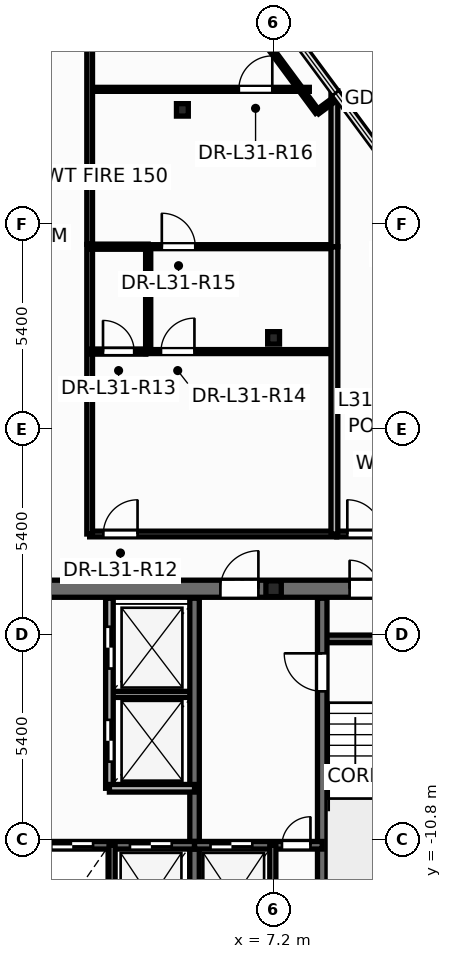
"""IFC4 building model, lengths in metres.
Left out: names, types, materials, properties, quantities, classifications, styles, units other than length and angle.
Written with IfcOpenShell. Run it as: python <this file> out.ifc"""

import sys

from ifc_helpers import new_model, si_unit, direction, frame, frame_2d, origin, origin_2d, place, context, subcontext, project, spatial, rectangle, i_section, extrude, element, fill, save


model = new_model("IFC4")
c1 = context("Model", 3, precision=1e-05, world=origin(), true_north=direction((0.0, 1.0)))
c2 = subcontext(c1, "Body", "Model", "MODEL_VIEW")
j1 = project(units=[si_unit("LENGTHUNIT", "METRE"), si_unit("PLANEANGLEUNIT", "RADIAN")], contexts=[c1])
p1 = place(None, origin())
s1 = spatial("IfcSite", under=j1, at=p1, CompositionType="ELEMENT")
p2 = place(p1, origin())
s2 = spatial("IfcBuilding", under=s1, at=p2, CompositionType="ELEMENT")
p3 = place(p2, frame((0.0, 0.0, 122.1)))
s3 = spatial("IfcBuildingStorey", under=s2, at=p3, CompositionType="ELEMENT", Elevation=122.1)
p4 = place(p3, frame((7.2, -4.2, 0.0), z_axis=(0.0, 0.0, 1.0), x_axis=(1.0, 0.0, 0.0)))
e1 = element("IfcColumn", 1, at=p4, inside=s3, PredefinedType="PILASTER", context=c2, shape_type="SweptSolid", body=[
    extrude(i_section(OverallWidth=0.405, OverallDepth=0.414, WebThickness=0.022, FlangeThickness=0.032, at=origin_2d()), origin(), (0.0, 0.0, 1.0), 3.6),
])
for number, where, z_axis, x_axis in (
    (2, (7.2, 2.4, 0.0), (0.0, 0.0, 1.0), (1.0, 0.0, 0.0)),
    (3, (4.8, 8.4, 0.0), (0.0, 0.0, 1.0), (1.0, 0.0, 0.0)),
):
    element("IfcColumn", number, at=place(p3, frame(where, z_axis=z_axis, x_axis=x_axis)), inside=s3, PredefinedType="COLUMN", context=c2, shape_type="SweptSolid", body=[
        extrude(i_section(OverallWidth=0.311, OverallDepth=0.327, WebThickness=0.016, FlangeThickness=0.025, at=origin_2d()), origin(), (0.0, 0.0, 1.0), 3.6),
    ])
p5 = place(p3, frame((2.88, -6.98, 0.0), z_axis=(0.0, 0.0, 1.0), x_axis=(1.0, 0.0, 0.0)))
e4 = element("IfcWall", 4, at=p5, inside=s3, PredefinedType="PARTITIONING", context=c2, shape_type="SweptSolid", body=[
    extrude(rectangle(XDim=2.24, YDim=0.16, at=frame_2d((1.12, 0.0))), origin(), (0.0, 0.0, 1.0), 3.35),
])
p6 = place(p3, frame((-12.65, -4.2, 0.0), z_axis=(0.0, 0.0, 1.0), x_axis=(1.0, 0.0, 0.0)))
e5 = element("IfcWall", 5, at=p6, inside=s3, PredefinedType="SHEAR", context=c2, shape_type="SweptSolid", body=[
    extrude(rectangle(XDim=25.3, YDim=0.45, at=frame_2d((12.65, 0.0))), origin(), (0.0, 0.0, 1.0), 3.6),
])
p7 = place(p6, frame((1.85, 0.0, 0.0)))
e6 = element("IfcOpeningElement", 6, at=p7, cuts=e5, PredefinedType="OPENING", context=c2, shape_type="SweptSolid", body=[
    extrude(rectangle(XDim=0.756, YDim=2.054, at=frame_2d((0.375, 1.027))), frame((0.0, 0.235, 0.0), z_axis=(0.0, -1.0, 0.0), x_axis=(1.0, 0.0, 0.0)), (0.0, 0.0, 1.0), 0.47),
])
p8 = place(p6, frame((21.85, 0.0, 0.0)))
e7 = element("IfcOpeningElement", 7, at=p8, cuts=e5, PredefinedType="OPENING", context=c2, shape_type="SweptSolid", body=[
    extrude(rectangle(XDim=0.756, YDim=2.054, at=frame_2d((0.375, 1.027))), frame((0.0, 0.235, 0.0), z_axis=(0.0, -1.0, 0.0), x_axis=(1.0, 0.0, 0.0)), (0.0, 0.0, 1.0), 0.47),
])
p9 = place(p6, frame((23.5, 0.0, 0.0)))
e8 = element("IfcOpeningElement", 8, at=p9, cuts=e5, PredefinedType="OPENING", context=c2, shape_type="SweptSolid", body=[
    extrude(rectangle(XDim=0.756, YDim=2.054, at=frame_2d((0.375, 1.027))), frame((0.0, 0.235, 0.0), z_axis=(0.0, -1.0, 0.0), x_axis=(1.0, 0.0, 0.0)), (0.0, 0.0, 1.0), 0.47),
])
p10 = place(p6, frame((5.85, 0.0, 0.0)))
e9 = element("IfcOpeningElement", 9, at=p10, cuts=e5, PredefinedType="OPENING", context=c2, shape_type="SweptSolid", body=[
    extrude(rectangle(XDim=1.006, YDim=2.104, at=frame_2d((0.5, 1.052))), frame((0.0, 0.235, 0.0), z_axis=(0.0, -1.0, 0.0), x_axis=(1.0, 0.0, 0.0)), (0.0, 0.0, 1.0), 0.47),
])
p11 = place(p6, frame((10.35, 0.0, 0.0)))
e10 = element("IfcOpeningElement", 10, at=p11, cuts=e5, PredefinedType="OPENING", context=c2, shape_type="SweptSolid", body=[
    extrude(rectangle(XDim=1.406, YDim=2.154, at=frame_2d((0.7, 1.077))), frame((0.0, 0.235, 0.0), z_axis=(0.0, -1.0, 0.0), x_axis=(1.0, 0.0, 0.0)), (0.0, 0.0, 1.0), 0.47),
])
p12 = place(p6, frame((18.45, 0.0, 0.0)))
e11 = element("IfcOpeningElement", 11, at=p12, cuts=e5, PredefinedType="OPENING", context=c2, shape_type="SweptSolid", body=[
    extrude(rectangle(XDim=1.006, YDim=2.104, at=frame_2d((0.5, 1.052))), frame((0.0, 0.235, 0.0), z_axis=(0.0, -1.0, 0.0), x_axis=(1.0, 0.0, 0.0)), (0.0, 0.0, 1.0), 0.47),
])
p13 = place(p3, frame((8.48, -5.52, 0.0), z_axis=(0.0, 0.0, 1.0), x_axis=(1.0, 0.0, 0.0)))
e12 = element("IfcWall", 12, at=p13, inside=s3, PredefinedType="SOLIDWALL", context=c2, shape_type="SweptSolid", body=[
    extrude(rectangle(XDim=3.87, YDim=0.2, at=frame_2d((1.935, 0.0))), origin(), (0.0, 0.0, 1.0), 3.6),
])
p14 = place(p3, frame((8.48, -13.85, 0.0), z_axis=(0.0, 0.0, 1.0), x_axis=(0.0, 1.0, 0.0)))
e13 = element("IfcWall", 13, at=p14, inside=s3, PredefinedType="SHEAR", context=c2, shape_type="SweptSolid", body=[
    extrude(rectangle(XDim=9.4, YDim=0.25, at=frame_2d((4.7, 0.0))), origin(), (0.0, 0.0, 1.0), 3.6),
])
p15 = place(p14, frame((6.95, 0.0, 0.0)))
e14 = element("IfcOpeningElement", 14, at=p15, cuts=e13, PredefinedType="OPENING", context=c2, shape_type="SweptSolid", body=[
    extrude(rectangle(XDim=1.006, YDim=2.104, at=frame_2d((0.5, 1.052))), frame((0.0, 0.135, 0.0), z_axis=(0.0, -1.0, 0.0), x_axis=(1.0, 0.0, 0.0)), (0.0, 0.0, 1.0), 0.27),
])
p16 = place(p3, frame((5.12, -13.85, 0.0), z_axis=(0.0, 0.0, 1.0), x_axis=(0.0, 1.0, 0.0)))
e15 = element("IfcWall", 15, at=p16, inside=s3, PredefinedType="SHEAR", context=c2, shape_type="SweptSolid", body=[
    extrude(rectangle(XDim=9.4, YDim=0.25, at=frame_2d((4.7, 0.0))), origin(), (0.0, 0.0, 1.0), 3.6),
])
p17 = place(p3, frame((-5.12, -10.95, 0.0), z_axis=(0.0, 0.0, 1.0), x_axis=(1.0, 0.0, 0.0)))
e16 = element("IfcWall", 16, at=p17, inside=s3, PredefinedType="SOLIDWALL", context=c2, shape_type="SweptSolid", body=[
    extrude(rectangle(XDim=10.24, YDim=0.2, at=frame_2d((5.12, 0.0))), origin(), (0.0, 0.0, 1.0), 3.6),
])
p18 = place(p17, frame((0.6, 0.0, 0.0)))
e17 = element("IfcOpeningElement", 17, at=p18, cuts=e16, PredefinedType="OPENING", context=c2, shape_type="SweptSolid", body=[
    extrude(rectangle(XDim=1.106, YDim=2.104, at=frame_2d((0.55, 1.052))), frame((0.0, 0.11, 0.0), z_axis=(0.0, -1.0, 0.0), x_axis=(1.0, 0.0, 0.0)), (0.0, 0.0, 1.0), 0.22),
])
p19 = place(p17, frame((2.67, 0.0, 0.0)))
e18 = element("IfcOpeningElement", 18, at=p19, cuts=e16, PredefinedType="OPENING", context=c2, shape_type="SweptSolid", body=[
    extrude(rectangle(XDim=1.106, YDim=2.104, at=frame_2d((0.55, 1.052))), frame((0.0, 0.11, 0.0), z_axis=(0.0, -1.0, 0.0), x_axis=(1.0, 0.0, 0.0)), (0.0, 0.0, 1.0), 0.22),
])
p20 = place(p17, frame((4.57, 0.0, 0.0)))
e19 = element("IfcOpeningElement", 19, at=p20, cuts=e16, PredefinedType="OPENING", context=c2, shape_type="SweptSolid", body=[
    extrude(rectangle(XDim=1.106, YDim=2.104, at=frame_2d((0.55, 1.052))), frame((0.0, 0.11, 0.0), z_axis=(0.0, -1.0, 0.0), x_axis=(1.0, 0.0, 0.0)), (0.0, 0.0, 1.0), 0.22),
])
p21 = place(p17, frame((6.47, 0.0, 0.0)))
e20 = element("IfcOpeningElement", 20, at=p21, cuts=e16, PredefinedType="OPENING", context=c2, shape_type="SweptSolid", body=[
    extrude(rectangle(XDim=1.106, YDim=2.104, at=frame_2d((0.55, 1.052))), frame((0.0, 0.11, 0.0), z_axis=(0.0, -1.0, 0.0), x_axis=(1.0, 0.0, 0.0)), (0.0, 0.0, 1.0), 0.22),
])
p22 = place(p17, frame((8.54, 0.0, 0.0)))
e21 = element("IfcOpeningElement", 21, at=p22, cuts=e16, PredefinedType="OPENING", context=c2, shape_type="SweptSolid", body=[
    extrude(rectangle(XDim=1.106, YDim=2.104, at=frame_2d((0.55, 1.052))), frame((0.0, 0.11, 0.0), z_axis=(0.0, -1.0, 0.0), x_axis=(1.0, 0.0, 0.0)), (0.0, 0.0, 1.0), 0.22),
])
p23 = place(p3, frame((5.12, -10.95, 0.0), z_axis=(0.0, 0.0, 1.0), x_axis=(1.0, 0.0, 0.0)))
e22 = element("IfcWall", 22, at=p23, inside=s3, PredefinedType="SOLIDWALL", context=c2, shape_type="SweptSolid", body=[
    extrude(rectangle(XDim=3.36, YDim=0.2, at=frame_2d((1.68, 0.0))), origin(), (0.0, 0.0, 1.0), 3.6),
])
p24 = place(p23, frame((0.42, 0.0, 0.0)))
e23 = element("IfcOpeningElement", 23, at=p24, cuts=e22, PredefinedType="OPENING", context=c2, shape_type="SweptSolid", body=[
    extrude(rectangle(XDim=1.106, YDim=2.104, at=frame_2d((0.55, 1.052))), frame((0.0, 0.11, 0.0), z_axis=(0.0, -1.0, 0.0), x_axis=(1.0, 0.0, 0.0)), (0.0, 0.0, 1.0), 0.22),
])
p25 = place(p23, frame((2.3, 0.0, 0.0)))
e24 = element("IfcOpeningElement", 24, at=p25, cuts=e22, PredefinedType="OPENING", context=c2, shape_type="SweptSolid", body=[
    extrude(rectangle(XDim=0.756, YDim=2.054, at=frame_2d((0.375, 1.027))), frame((0.0, 0.11, 0.0), z_axis=(0.0, -1.0, 0.0), x_axis=(1.0, 0.0, 0.0)), (0.0, 0.0, 1.0), 0.22),
])
for number, where, z_axis, x_axis in (
    (25, (7.18, -13.85, 0.0), (0.0, 0.0, 1.0), (0.0, 1.0, 0.0)),
    (26, (2.95, -13.85, 0.0), (0.0, 0.0, 1.0), (0.0, 1.0, 0.0)),
):
    element("IfcWall", number, at=place(p3, frame(where, z_axis=z_axis, x_axis=x_axis)), inside=s3, PredefinedType="PARTITIONING", context=c2, shape_type="SweptSolid", body=[
        extrude(rectangle(XDim=2.9, YDim=0.16, at=frame_2d((1.45, 0.0))), origin(), (0.0, 0.0, 1.0), 2.475),
    ])
p26 = place(p3, frame((2.88, -9.45, 0.0), z_axis=(0.0, 0.0, 1.0), x_axis=(0.0, 1.0, 0.0)))
e27 = element("IfcWall", 27, at=p26, inside=s3, PredefinedType="SOLIDWALL", context=c2, shape_type="SweptSolid", body=[
    extrude(rectangle(XDim=5.0, YDim=0.2, at=frame_2d((2.5, 0.0))), origin(), (0.0, 0.0, 1.0), 3.35),
])
p27 = place(p26, frame((0.7, 0.0, 0.0)))
e28 = element("IfcOpeningElement", 28, at=p27, cuts=e27, PredefinedType="OPENING", context=c2, shape_type="SweptSolid", body=[
    extrude(rectangle(XDim=1.106, YDim=2.104, at=frame_2d((0.55, 1.052))), frame((0.0, 0.11, 0.0), z_axis=(0.0, -1.0, 0.0), x_axis=(1.0, 0.0, 0.0)), (0.0, 0.0, 1.0), 0.22),
])
p28 = place(p26, frame((3.15, 0.0, 0.0)))
e29 = element("IfcOpeningElement", 29, at=p28, cuts=e27, PredefinedType="OPENING", context=c2, shape_type="SweptSolid", body=[
    extrude(rectangle(XDim=1.106, YDim=2.104, at=frame_2d((0.55, 1.052))), frame((0.0, 0.11, 0.0), z_axis=(0.0, -1.0, 0.0), x_axis=(1.0, 0.0, 0.0)), (0.0, 0.0, 1.0), 0.22),
])
p29 = place(p3, frame((2.88, -9.45, 0.0), z_axis=(0.0, 0.0, 1.0), x_axis=(1.0, 0.0, 0.0)))
e30 = element("IfcWall", 30, at=p29, inside=s3, PredefinedType="SOLIDWALL", context=c2, shape_type="SweptSolid", body=[
    extrude(rectangle(XDim=2.24, YDim=0.2, at=frame_2d((1.12, 0.0))), origin(), (0.0, 0.0, 1.0), 3.35),
])
p30 = place(p3, frame((2.36, -2.76, 0.0), z_axis=(0.0, 0.0, 1.0), x_axis=(1.0, 0.0, 0.0)))
e31 = element("IfcWall", 31, at=p30, inside=s3, PredefinedType="PARTITIONING", context=c2, shape_type="SweptSolid", body=[
    extrude(rectangle(XDim=6.5, YDim=0.15, at=frame_2d((3.25, 0.0))), origin(), (0.0, 0.0, 1.0), 2.325),
])
p31 = place(p30, frame((0.36, 0.0, 0.0)))
e32 = element("IfcOpeningElement", 32, at=p31, cuts=e31, PredefinedType="OPENING", context=c2, shape_type="SweptSolid", body=[
    extrude(rectangle(XDim=0.906, YDim=2.104, at=frame_2d((0.45, 1.052))), frame((0.0, 0.085, 0.0), z_axis=(0.0, -1.0, 0.0), x_axis=(1.0, 0.0, 0.0)), (0.0, 0.0, 1.0), 0.17),
])
p32 = place(p3, frame((8.862, -2.76, 0.0), z_axis=(0.0, 0.0, 1.0), x_axis=(1.0, 0.0, 0.0)))
e33 = element("IfcWall", 33, at=p32, inside=s3, PredefinedType="PARTITIONING", context=c2, shape_type="SweptSolid", body=[
    extrude(rectangle(XDim=5.778, YDim=0.15, at=frame_2d((2.889, 0.0))), origin(), (0.0, 0.0, 1.0), 3.35),
])
p33 = place(p32, frame((0.278, 0.0, 0.0)))
e34 = element("IfcOpeningElement", 34, at=p33, cuts=e33, PredefinedType="OPENING", context=c2, shape_type="SweptSolid", body=[
    extrude(rectangle(XDim=0.906, YDim=2.104, at=frame_2d((0.45, 1.052))), frame((0.0, 0.085, 0.0), z_axis=(0.0, -1.0, 0.0), x_axis=(1.0, 0.0, 0.0)), (0.0, 0.0, 1.0), 0.17),
])
p34 = place(p3, frame((2.36, 8.94, 0.0), z_axis=(0.0, 0.0, 1.0), x_axis=(1.0, 0.0, 0.0)))
e35 = element("IfcWall", 35, at=p34, inside=s3, PredefinedType="PARTITIONING", context=c2, shape_type="SweptSolid", body=[
    extrude(rectangle(XDim=5.78, YDim=0.105, at=frame_2d((2.89, 0.0))), origin(), (0.0, 0.0, 1.0), 2.617),
])
p35 = place(p34, frame((3.926, 0.0, 0.0)))
e36 = element("IfcOpeningElement", 36, at=p35, cuts=e35, PredefinedType="OPENING", context=c2, shape_type="SweptSolid", body=[
    extrude(rectangle(XDim=0.886, YDim=2.104, at=frame_2d((0.44, 1.052))), frame((0.0, 0.062, 0.0), z_axis=(0.0, -1.0, 0.0), x_axis=(1.0, 0.0, 0.0)), (0.0, 0.0, 1.0), 0.125),
])
p36 = place(p3, frame((3.84, 2.04, 0.0), z_axis=(0.0, 0.0, 1.0), x_axis=(1.0, 0.0, 0.0)))
e37 = element("IfcWall", 37, at=p36, inside=s3, PredefinedType="PARTITIONING", context=c2, shape_type="SweptSolid", body=[
    extrude(rectangle(XDim=4.96, YDim=0.105, at=frame_2d((2.48, 0.0))), origin(), (0.0, 0.0, 1.0), 2.325),
])
p37 = place(p36, frame((0.397, 0.0, 0.0)))
e38 = element("IfcOpeningElement", 38, at=p37, cuts=e37, PredefinedType="OPENING", context=c2, shape_type="SweptSolid", body=[
    extrude(rectangle(XDim=0.886, YDim=2.104, at=frame_2d((0.44, 1.052))), frame((0.0, 0.062, 0.0), z_axis=(0.0, -1.0, 0.0), x_axis=(1.0, 0.0, 0.0)), (0.0, 0.0, 1.0), 0.125),
])
p38 = place(p3, frame((3.9, 4.8, 0.0), z_axis=(0.0, 0.0, 1.0), x_axis=(1.0, 0.0, 0.0)))
e39 = element("IfcWall", 39, at=p38, inside=s3, PredefinedType="PARTITIONING", context=c2, shape_type="SweptSolid", body=[
    extrude(rectangle(XDim=4.9, YDim=0.105, at=frame_2d((2.45, 0.0))), origin(), (0.0, 0.0, 1.0), 2.617),
])
p39 = place(p38, frame((0.359, 0.0, 0.0)))
e40 = element("IfcOpeningElement", 40, at=p39, cuts=e39, PredefinedType="OPENING", context=c2, shape_type="SweptSolid", body=[
    extrude(rectangle(XDim=0.886, YDim=2.104, at=frame_2d((0.44, 1.052))), frame((0.0, 0.062, 0.0), z_axis=(0.0, -1.0, 0.0), x_axis=(1.0, 0.0, 0.0)), (0.0, 0.0, 1.0), 0.125),
])
p40 = place(p3, frame((2.36, -2.76, 0.0), z_axis=(0.0, 0.0, 1.0), x_axis=(0.0, 1.0, 0.0)))
e41 = element("IfcWall", 41, at=p40, inside=s3, PredefinedType="PARTITIONING", context=c2, shape_type="SweptSolid", body=[
    extrude(rectangle(XDim=7.62, YDim=0.15, at=frame_2d((3.81, 0.0))), origin(), (0.0, 0.0, 1.0), 2.325),
])
p41 = place(p3, frame((8.8, -2.76, 0.0), z_axis=(0.0, 0.0, 1.0), x_axis=(0.0, 1.0, 0.0)))
e42 = element("IfcWall", 42, at=p41, inside=s3, PredefinedType="PARTITIONING", context=c2, shape_type="SweptSolid", body=[
    extrude(rectangle(XDim=7.56, YDim=0.18, at=frame_2d((3.78, 0.0))), origin(), (0.0, 0.0, 1.0), 2.617),
])
p42 = place(p3, frame((2.36, 4.862, 0.0), z_axis=(0.0, 0.0, 1.0), x_axis=(0.0, 1.0, 0.0)))
e43 = element("IfcWall", 43, at=p42, inside=s3, PredefinedType="PARTITIONING", context=c2, shape_type="SweptSolid", body=[
    extrude(rectangle(XDim=8.18, YDim=0.15, at=frame_2d((4.09, 0.0))), origin(), (0.0, 0.0, 1.0), 2.617),
])
p43 = place(p3, frame((8.8, 4.8, 0.0), z_axis=(0.0, 0.0, 1.0), x_axis=(0.0, 1.0, 0.0)))
e44 = element("IfcWall", 44, at=p43, inside=s3, PredefinedType="PARTITIONING", context=c2, shape_type="SweptSolid", body=[
    extrude(rectangle(XDim=4.1, YDim=0.18, at=frame_2d((2.05, 0.0))), origin(), (0.0, 0.0, 1.0), 2.617),
])
p44 = place(p3, frame((3.9, 2.04, 0.0), z_axis=(0.0, 0.0, 1.0), x_axis=(0.0, 1.0, 0.0)))
e45 = element("IfcWall", 45, at=p44, inside=s3, PredefinedType="PARTITIONING", context=c2, shape_type="SweptSolid", body=[
    extrude(rectangle(XDim=2.76, YDim=0.135, at=frame_2d((1.38, 0.0))), origin(), (0.0, 0.0, 1.0), 2.325),
])
p45 = place(p3, frame((8.353, 8.344, 0.0), z_axis=(0.0, 0.0, 1.0), x_axis=(-0.594589014846, 0.804029790135, 0.0)))
e46 = element("IfcWall", 46, at=p45, inside=s3, PredefinedType="PARTITIONING", context=c2, shape_type="SweptSolid", body=[
    extrude(rectangle(XDim=2.323, YDim=0.12, at=frame_2d((1.162, 0.0))), origin(), (0.0, 0.0, 1.0), 3.35),
])
p46 = place(p3, frame((2.36, 2.04, 0.0), z_axis=(0.0, 0.0, 1.0), x_axis=(1.0, 0.0, 0.0)))
e47 = element("IfcWall", 47, at=p46, inside=s3, PredefinedType="PARTITIONING", context=c2, shape_type="SweptSolid", body=[
    extrude(rectangle(XDim=1.478, YDim=0.135, at=frame_2d((0.739, 0.0))), origin(), (0.0, 0.0, 1.0), 2.918),
])
p47 = place(p46, frame((0.351, 0.0, 0.0)))
e48 = element("IfcOpeningElement", 48, at=p47, cuts=e47, PredefinedType="OPENING", context=c2, shape_type="SweptSolid", body=[
    extrude(rectangle(XDim=0.826, YDim=2.104, at=frame_2d((0.41, 1.052))), frame((0.0, 0.078, 0.0), z_axis=(0.0, -1.0, 0.0), x_axis=(1.0, 0.0, 0.0)), (0.0, 0.0, 1.0), 0.155),
])
p48 = place(p3, frame((2.36, 4.8, 0.0), z_axis=(0.0, 0.0, 1.0), x_axis=(1.0, 0.0, 0.0)))
e49 = element("IfcWall", 49, at=p48, inside=s3, PredefinedType="PARTITIONING", context=c2, shape_type="SweptSolid", body=[
    extrude(rectangle(XDim=1.54, YDim=0.135, at=frame_2d((0.77, 0.0))), origin(), (0.0, 0.0, 1.0), 2.918),
])
p49 = place(p3, frame((8.891, 8.743, 0.0), z_axis=(0.0, 0.0, 1.0), x_axis=(-0.803918563719, -0.594739390748, 0.0)))
e50 = element("IfcWall", 50, at=p49, inside=s3, PredefinedType="PARTITIONING", context=c2, shape_type="SweptSolid", body=[
    extrude(rectangle(XDim=0.67, YDim=0.12, at=frame_2d((0.335, 0.0))), origin(), (0.0, 0.0, 1.0), 2.792),
])
p50 = place(p27, origin())
e51 = element("IfcDoor", 51, at=p50, inside=s3, OperationType="DOUBLE_DOOR_SLIDING", PredefinedType="DOOR", context=c2, shape_type="SweptSolid", body=[
    extrude(rectangle(XDim=1.1, YDim=2.1, at=frame_2d((0.55, 1.05))), frame((0.0, 0.025, 0.0), z_axis=(0.0, -1.0, 0.0), x_axis=(1.0, 0.0, 0.0)), (0.0, 0.0, 1.0), 0.05),
])
fill(e28, e51)
p51 = place(p28, origin())
e52 = element("IfcDoor", 52, at=p51, inside=s3, OperationType="DOUBLE_DOOR_SLIDING", PredefinedType="DOOR", context=c2, shape_type="SweptSolid", body=[
    extrude(rectangle(XDim=1.1, YDim=2.1, at=frame_2d((0.55, 1.05))), frame((0.0, 0.025, 0.0), z_axis=(0.0, -1.0, 0.0), x_axis=(1.0, 0.0, 0.0)), (0.0, 0.0, 1.0), 0.05),
])
fill(e29, e52)
p52 = place(p15, origin())
e53 = element("IfcDoor", 53, at=p52, inside=s3, OperationType="SINGLE_SWING_RIGHT", PredefinedType="DOOR", context=c2, shape_type="SweptSolid", body=[
    extrude(rectangle(XDim=1.0, YDim=2.1, at=frame_2d((0.5, 1.05))), frame((0.0, 0.025, 0.0), z_axis=(0.0, -1.0, 0.0), x_axis=(1.0, 0.0, 0.0)), (0.0, 0.0, 1.0), 0.05),
])
fill(e14, e53)
p53 = place(p24, origin())
e54 = element("IfcDoor", 54, at=p53, inside=s3, OperationType="DOUBLE_DOOR_SLIDING", PredefinedType="DOOR", context=c2, shape_type="SweptSolid", body=[
    extrude(rectangle(XDim=1.1, YDim=2.1, at=frame_2d((0.55, 1.05))), frame((0.0, 0.025, 0.0), z_axis=(0.0, -1.0, 0.0), x_axis=(1.0, 0.0, 0.0)), (0.0, 0.0, 1.0), 0.05),
])
fill(e23, e54)
p54 = place(p25, origin())
e55 = element("IfcDoor", 55, at=p54, inside=s3, OperationType="SINGLE_SWING_RIGHT", PredefinedType="DOOR", context=c2, shape_type="SweptSolid", body=[
    extrude(rectangle(XDim=0.75, YDim=2.05, at=frame_2d((0.375, 1.025))), frame((0.0, 0.025, 0.0), z_axis=(0.0, -1.0, 0.0), x_axis=(1.0, 0.0, 0.0)), (0.0, 0.0, 1.0), 0.05),
])
fill(e24, e55)
p55 = place(p21, origin())
e56 = element("IfcDoor", 56, at=p55, inside=s3, OperationType="DOUBLE_DOOR_SLIDING", PredefinedType="DOOR", context=c2, shape_type="SweptSolid", body=[
    extrude(rectangle(XDim=1.1, YDim=2.1, at=frame_2d((0.55, 1.05))), frame((0.0, 0.025, 0.0), z_axis=(0.0, -1.0, 0.0), x_axis=(1.0, 0.0, 0.0)), (0.0, 0.0, 1.0), 0.05),
])
fill(e20, e56)
p56 = place(p22, origin())
e57 = element("IfcDoor", 57, at=p56, inside=s3, OperationType="DOUBLE_DOOR_SLIDING", PredefinedType="DOOR", context=c2, shape_type="SweptSolid", body=[
    extrude(rectangle(XDim=1.1, YDim=2.1, at=frame_2d((0.55, 1.05))), frame((0.0, 0.025, 0.0), z_axis=(0.0, -1.0, 0.0), x_axis=(1.0, 0.0, 0.0)), (0.0, 0.0, 1.0), 0.05),
])
fill(e21, e57)
p57 = place(p8, origin())
e58 = element("IfcDoor", 58, at=p57, inside=s3, OperationType="SINGLE_SWING_LEFT", PredefinedType="DOOR", context=c2, shape_type="SweptSolid", body=[
    extrude(rectangle(XDim=0.75, YDim=2.05, at=frame_2d((0.375, 1.025))), frame((0.0, 0.025, 0.0), z_axis=(0.0, -1.0, 0.0), x_axis=(1.0, 0.0, 0.0)), (0.0, 0.0, 1.0), 0.05),
])
fill(e7, e58)
p58 = place(p12, origin())
e59 = element("IfcDoor", 59, at=p58, inside=s3, OperationType="SINGLE_SWING_RIGHT", PredefinedType="DOOR", context=c2, shape_type="SweptSolid", body=[
    extrude(rectangle(XDim=1.0, YDim=2.1, at=frame_2d((0.5, 1.05))), frame((0.0, 0.025, 0.0), z_axis=(0.0, -1.0, 0.0), x_axis=(1.0, 0.0, 0.0)), (0.0, 0.0, 1.0), 0.05),
])
fill(e11, e59)
p59 = place(p31, origin())
e60 = element("IfcDoor", 60, at=p59, inside=s3, OperationType="SINGLE_SWING_RIGHT", PredefinedType="DOOR", context=c2, shape_type="SweptSolid", body=[
    extrude(rectangle(XDim=0.9, YDim=2.1, at=frame_2d((0.45, 1.05))), frame((0.0, 0.025, 0.0), z_axis=(0.0, -1.0, 0.0), x_axis=(1.0, 0.0, 0.0)), (0.0, 0.0, 1.0), 0.05),
])
fill(e32, e60)
p60 = place(p47, origin())
e61 = element("IfcDoor", 61, at=p60, inside=s3, OperationType="SINGLE_SWING_LEFT", PredefinedType="DOOR", context=c2, shape_type="SweptSolid", body=[
    extrude(rectangle(XDim=0.82, YDim=2.1, at=frame_2d((0.41, 1.05))), frame((0.0, 0.025, 0.0), z_axis=(0.0, -1.0, 0.0), x_axis=(1.0, 0.0, 0.0)), (0.0, 0.0, 1.0), 0.05),
])
fill(e48, e61)
p61 = place(p37, origin())
e62 = element("IfcDoor", 62, at=p61, inside=s3, OperationType="SINGLE_SWING_RIGHT", PredefinedType="DOOR", context=c2, shape_type="SweptSolid", body=[
    extrude(rectangle(XDim=0.88, YDim=2.1, at=frame_2d((0.44, 1.05))), frame((0.0, 0.025, 0.0), z_axis=(0.0, -1.0, 0.0), x_axis=(1.0, 0.0, 0.0)), (0.0, 0.0, 1.0), 0.05),
])
fill(e38, e62)
p62 = place(p39, origin())
e63 = element("IfcDoor", 63, at=p62, inside=s3, OperationType="SINGLE_SWING_LEFT", PredefinedType="DOOR", context=c2, shape_type="SweptSolid", body=[
    extrude(rectangle(XDim=0.88, YDim=2.1, at=frame_2d((0.44, 1.05))), frame((0.0, 0.025, 0.0), z_axis=(0.0, -1.0, 0.0), x_axis=(1.0, 0.0, 0.0)), (0.0, 0.0, 1.0), 0.05),
])
fill(e40, e63)
p63 = place(p35, origin())
e64 = element("IfcDoor", 64, at=p63, inside=s3, OperationType="SINGLE_SWING_RIGHT", PredefinedType="DOOR", context=c2, shape_type="SweptSolid", body=[
    extrude(rectangle(XDim=0.88, YDim=2.1, at=frame_2d((0.44, 1.05))), frame((0.0, 0.025, 0.0), z_axis=(0.0, -1.0, 0.0), x_axis=(1.0, 0.0, 0.0)), (0.0, 0.0, 1.0), 0.05),
])
fill(e36, e64)
p64 = place(p33, origin())
e65 = element("IfcDoor", 65, at=p64, inside=s3, OperationType="SINGLE_SWING_LEFT", PredefinedType="DOOR", context=c2, shape_type="SweptSolid", body=[
    extrude(rectangle(XDim=0.9, YDim=2.1, at=frame_2d((0.45, 1.05))), frame((0.0, 0.025, 0.0), z_axis=(0.0, -1.0, 0.0), x_axis=(1.0, 0.0, 0.0)), (0.0, 0.0, 1.0), 0.05),
])
fill(e34, e65)
save(model, sys.argv[1])
